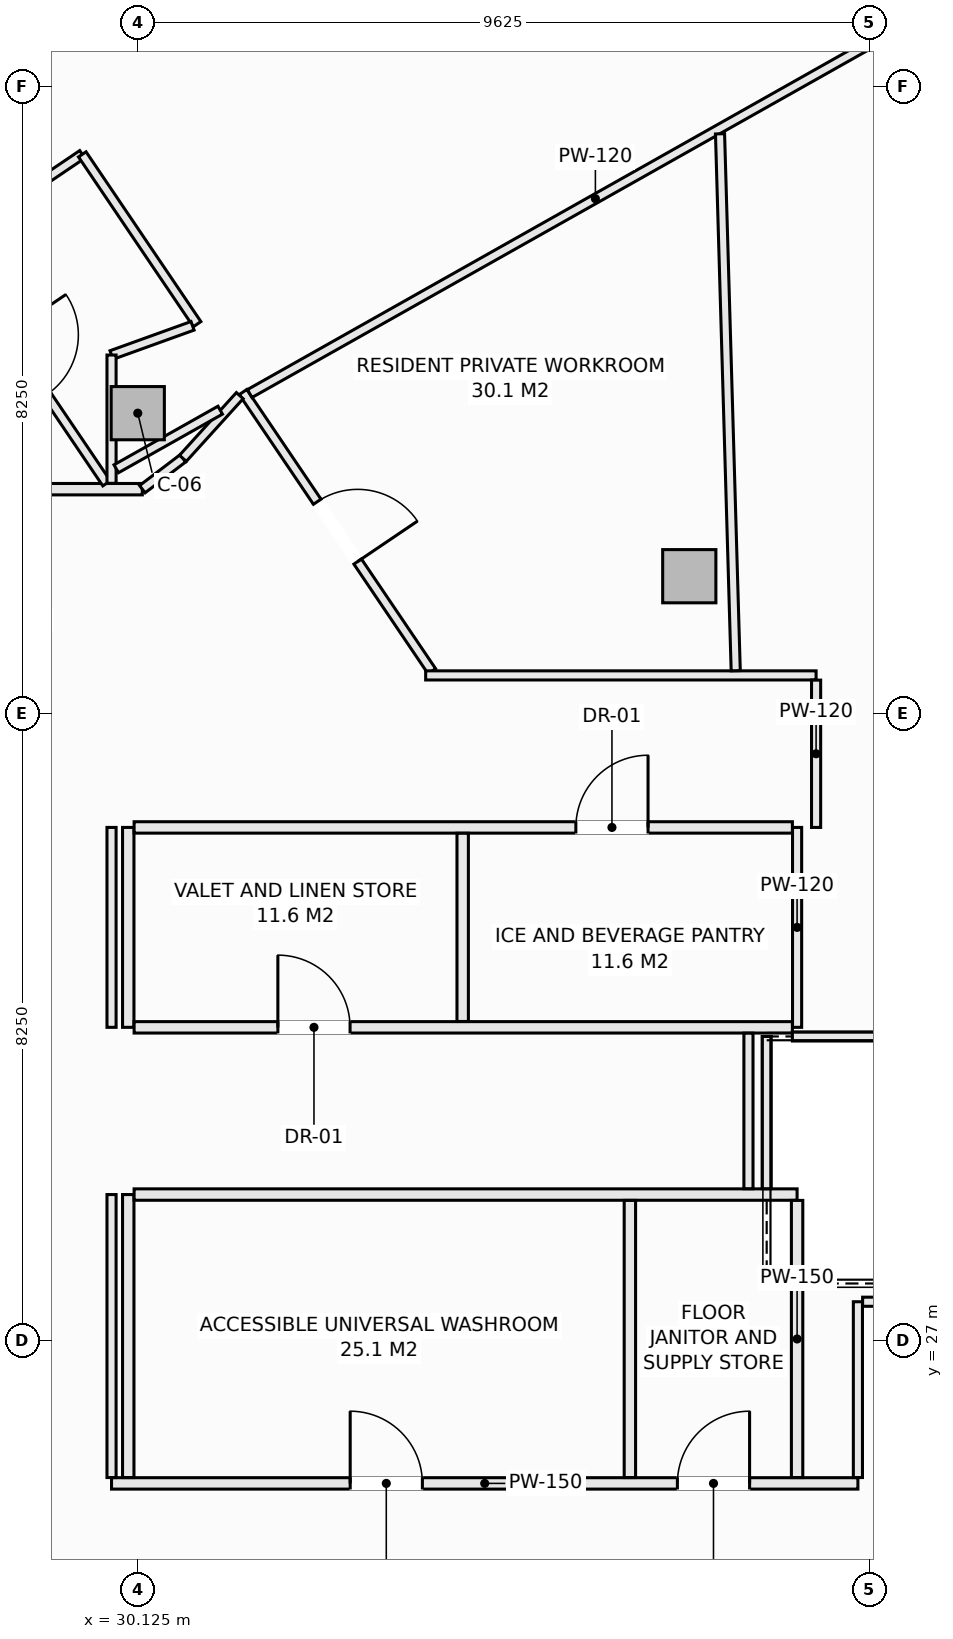
"""IFC4 building model, lengths in metres.
Left out: names, types, materials, properties, quantities, classifications, styles, units other than length and angle.
Written with IfcOpenShell. Run it as: python <this file> out.ifc"""

import sys

from ifc_helpers import new_model, si_unit, direction, frame, frame_2d, origin, origin_2d, place, context, subcontext, project, spatial, rectangle, extrude, element, fill, save


model = new_model("IFC4")
c1 = context("Model", 3, precision=1e-05, world=origin(), true_north=direction((0.0, 1.0)))
c2 = subcontext(c1, "Body", "Model", "MODEL_VIEW")
j1 = project(units=[si_unit("LENGTHUNIT", "METRE"), si_unit("PLANEANGLEUNIT", "RADIAN")], contexts=[c1])
p1 = place(None, origin())
s1 = spatial("IfcSite", under=j1, at=p1, CompositionType="ELEMENT")
p2 = place(p1, origin())
s2 = spatial("IfcBuilding", under=s1, at=p2, CompositionType="ELEMENT")
p3 = place(p2, frame((0.0, 0.0, 196.4)))
s3 = spatial("IfcBuildingStorey", under=s2, at=p3, CompositionType="ELEMENT", Elevation=196.4)
for number, where, z_axis, x_axis in (
    (1, (37.382, 37.055, -0.27), (0.0, 0.0, 1.0), (1.0, 0.0, 0.0)),
    (2, (30.125, 39.2, -0.27), (0.0, 0.0, 1.0), (1.0, 0.0, 0.0)),
):
    element("IfcColumn", number, at=place(p3, frame(where, z_axis=z_axis, x_axis=x_axis)), inside=s3, PredefinedType="COLUMN", context=c2, shape_type="SweptSolid", body=[
        extrude(rectangle(XDim=0.7, YDim=0.7, at=origin_2d()), origin(), (0.0, 0.0, 1.0), 3.3),
    ])
p4 = place(p3, frame((29.78, 25.12, 0.0), z_axis=(0.0, 0.0, 1.0), x_axis=(1.0, 0.0, 0.0)))
e3 = element("IfcWall", 3, at=p4, inside=s3, PredefinedType="PARTITIONING", context=c2, shape_type="SweptSolid", body=[
    extrude(rectangle(XDim=9.82, YDim=0.15, at=frame_2d((4.91, 0.0))), origin(), (0.0, 0.0, 1.0), 3.03),
])
p5 = place(p4, frame((3.14, 0.0, 0.0)))
e4 = element("IfcOpeningElement", 4, at=p5, cuts=e3, PredefinedType="OPENING", context=c2, shape_type="SweptSolid", body=[
    extrude(rectangle(XDim=0.95, YDim=2.1, at=frame_2d((0.475, 1.05))), frame((0.0, 0.085, 0.0), z_axis=(0.0, -1.0, 0.0), x_axis=(1.0, 0.0, 0.0)), (0.0, 0.0, 1.0), 0.17),
])
p6 = place(p4, frame((7.445, 0.0, 0.0)))
e5 = element("IfcOpeningElement", 5, at=p6, cuts=e3, PredefinedType="OPENING", context=c2, shape_type="SweptSolid", body=[
    extrude(rectangle(XDim=0.95, YDim=2.1, at=frame_2d((0.475, 1.05))), frame((0.0, 0.085, 0.0), z_axis=(0.0, -1.0, 0.0), x_axis=(1.0, 0.0, 0.0)), (0.0, 0.0, 1.0), 0.17),
])
p7 = place(p3, frame((30.0, 25.197, 0.0), z_axis=(0.0, 0.0, 1.0), x_axis=(0.0, 1.0, 0.0)))
e6 = element("IfcWall", 6, at=p7, inside=s3, PredefinedType="PARTITIONING", context=c2, shape_type="SweptSolid", body=[
    extrude(rectangle(XDim=3.723, YDim=0.15, at=frame_2d((1.861, 0.0))), origin(), (0.0, 0.0, 1.0), 3.03),
])
p8 = place(p3, frame((30.0, 31.12, 0.0), z_axis=(0.0, 0.0, 1.0), x_axis=(0.0, 1.0, 0.0)))
e7 = element("IfcWall", 7, at=p8, inside=s3, PredefinedType="PARTITIONING", context=c2, shape_type="SweptSolid", body=[
    extrude(rectangle(XDim=2.63, YDim=0.15, at=frame_2d((1.315, 0.0))), origin(), (0.0, 0.0, 1.0), 3.03),
])
p9 = place(p3, frame((30.077, 28.92, 0.0), z_axis=(0.0, 0.0, 1.0), x_axis=(1.0, 0.0, 0.0)))
e8 = element("IfcWall", 8, at=p9, inside=s3, PredefinedType="PARTITIONING", context=c2, shape_type="SweptSolid", body=[
    extrude(rectangle(XDim=8.723, YDim=0.15, at=frame_2d((4.362, 0.0))), origin(), (0.0, 0.0, 1.0), 3.03),
])
for number, where, z_axis, x_axis in (
    (9, (36.6, 25.197, 0.0), (0.0, 0.0, 1.0), (0.0, 1.0, 0.0)),
    (10, (38.8, 25.197, 0.0), (0.0, 0.0, 1.0), (0.0, 1.0, 0.0)),
):
    element("IfcWall", number, at=place(p3, frame(where, z_axis=z_axis, x_axis=x_axis)), inside=s3, PredefinedType="PARTITIONING", context=c2, shape_type="SweptSolid", body=[
        extrude(rectangle(XDim=3.646, YDim=0.15, at=frame_2d((1.823, 0.0))), origin(), (0.0, 0.0, 1.0), 3.03),
    ])
p10 = place(p3, frame((38.8, 31.12, 0.0), z_axis=(0.0, 0.0, 1.0), x_axis=(0.0, 1.0, 0.0)))
e11 = element("IfcWall", 11, at=p10, inside=s3, PredefinedType="PARTITIONING", context=c2, shape_type="SweptSolid", body=[
    extrude(rectangle(XDim=2.63, YDim=0.12, at=frame_2d((1.315, 0.0))), origin(), (0.0, 0.0, 1.0), 3.03),
])
p11 = place(p3, frame((30.077, 31.12, 0.0), z_axis=(0.0, 0.0, 1.0), x_axis=(1.0, 0.0, 0.0)))
e12 = element("IfcWall", 12, at=p11, inside=s3, PredefinedType="PARTITIONING", context=c2, shape_type="SweptSolid", body=[
    extrude(rectangle(XDim=8.661, YDim=0.15, at=frame_2d((4.331, 0.0))), origin(), (0.0, 0.0, 1.0), 3.03),
])
p12 = place(p11, frame((1.892, 0.0, 0.0)))
e13 = element("IfcOpeningElement", 13, at=p12, cuts=e12, PredefinedType="OPENING", context=c2, shape_type="SweptSolid", body=[
    extrude(rectangle(XDim=0.95, YDim=2.1, at=frame_2d((0.475, 1.05))), frame((0.0, 0.085, 0.0), z_axis=(0.0, -1.0, 0.0), x_axis=(1.0, 0.0, 0.0)), (0.0, 0.0, 1.0), 0.17),
])
p13 = place(p3, frame((30.077, 33.75, 0.0), z_axis=(0.0, 0.0, 1.0), x_axis=(1.0, 0.0, 0.0)))
e14 = element("IfcWall", 14, at=p13, inside=s3, PredefinedType="PARTITIONING", context=c2, shape_type="SweptSolid", body=[
    extrude(rectangle(XDim=8.661, YDim=0.15, at=frame_2d((4.331, 0.0))), origin(), (0.0, 0.0, 1.0), 3.03),
])
p14 = place(p13, frame((5.812, 0.0, 0.0)))
e15 = element("IfcOpeningElement", 15, at=p14, cuts=e14, PredefinedType="OPENING", context=c2, shape_type="SweptSolid", body=[
    extrude(rectangle(XDim=0.95, YDim=2.1, at=frame_2d((0.475, 1.05))), frame((0.0, 0.085, 0.0), z_axis=(0.0, -1.0, 0.0), x_axis=(1.0, 0.0, 0.0)), (0.0, 0.0, 1.0), 0.17),
])
p15 = place(p3, frame((34.4, 31.197, 0.0), z_axis=(0.0, 0.0, 1.0), x_axis=(0.0, 1.0, 0.0)))
e16 = element("IfcWall", 16, at=p15, inside=s3, PredefinedType="PARTITIONING", context=c2, shape_type="SweptSolid", body=[
    extrude(rectangle(XDim=2.476, YDim=0.15, at=frame_2d((1.238, 0.0))), origin(), (0.0, 0.0, 1.0), 3.03),
])
p16 = place(p3, frame((27.227, 38.2, 0.0), z_axis=(0.0, 0.0, 1.0), x_axis=(1.0, 0.0, 0.0)))
e17 = element("IfcWall", 17, at=p16, inside=s3, PredefinedType="PARTITIONING", context=c2, shape_type="SweptSolid", body=[
    extrude(rectangle(XDim=2.958, YDim=0.15, at=frame_2d((1.479, 0.0))), origin(), (0.0, 0.0, 1.0), 3.03),
])
p17 = place(p3, frame((27.605, 41.395, 0.0), z_axis=(0.0, 0.0, 1.0), x_axis=(0.560433673257, -0.82819931048, 0.0)))
e18 = element("IfcWall", 18, at=p17, inside=s3, PredefinedType="PARTITIONING", context=c2, shape_type="SweptSolid", body=[
    extrude(rectangle(XDim=3.765, YDim=0.12, at=frame_2d((1.882, 0.0))), origin(), (0.0, 0.0, 1.0), 3.03),
])
p18 = place(p17, frame((1.407, 0.0, 0.0)))
e19 = element("IfcOpeningElement", 19, at=p18, cuts=e18, PredefinedType="OPENING", context=c2, shape_type="SweptSolid", body=[
    extrude(rectangle(XDim=0.95, YDim=2.1, at=frame_2d((0.475, 1.05))), frame((0.0, 0.07, 0.0), z_axis=(0.0, -1.0, 0.0), x_axis=(1.0, 0.0, 0.0)), (0.0, 0.0, 1.0), 0.14),
])
p19 = place(p3, frame((27.656, 41.43, 0.0), z_axis=(0.0, 0.0, 1.0), x_axis=(0.828453292792, 0.560058159178, 0.0)))
e20 = element("IfcWall", 20, at=p19, inside=s3, PredefinedType="PARTITIONING", context=c2, shape_type="SweptSolid", body=[
    extrude(rectangle(XDim=2.099, YDim=0.12, at=frame_2d((1.049, 0.0))), origin(), (0.0, 0.0, 1.0), 3.03),
])
p20 = place(p3, frame((29.395, 42.605, 0.0), z_axis=(0.0, 0.0, 1.0), x_axis=(0.560265527613, -0.828313067969, 0.0)))
e21 = element("IfcWall", 21, at=p20, inside=s3, PredefinedType="PARTITIONING", context=c2, shape_type="SweptSolid", body=[
    extrude(rectangle(XDim=2.697, YDim=0.12, at=frame_2d((1.349, 0.0))), origin(), (0.0, 0.0, 1.0), 2.712),
])
p21 = place(p3, frame((31.51, 39.478, 0.0), z_axis=(0.0, 0.0, 1.0), x_axis=(0.560227160028, -0.828339018257, 0.0)))
e22 = element("IfcWall", 22, at=p21, inside=s3, PredefinedType="PARTITIONING", context=c2, shape_type="SweptSolid", body=[
    extrude(rectangle(XDim=4.435, YDim=0.12, at=frame_2d((2.217, 0.0))), origin(), (0.0, 0.0, 1.0), 3.03),
])
p22 = place(p21, frame((1.742, 0.0, 0.0)))
e23 = element("IfcOpeningElement", 23, at=p22, cuts=e22, PredefinedType="OPENING", context=c2, shape_type="SweptSolid", body=[
    extrude(rectangle(XDim=0.95, YDim=2.1, at=frame_2d((0.475, 1.05))), frame((0.0, 0.07, 0.0), z_axis=(0.0, -1.0, 0.0), x_axis=(1.0, 0.0, 0.0)), (0.0, 0.0, 1.0), 0.14),
])
p23 = place(p3, frame((29.78, 39.965, 0.0), z_axis=(0.0, 0.0, 1.0), x_axis=(0.940708705525, 0.33921546449, 0.0)))
e24 = element("IfcWall", 24, at=p23, inside=s3, PredefinedType="PARTITIONING", context=c2, shape_type="SweptSolid", body=[
    extrude(rectangle(XDim=1.133, YDim=0.12, at=frame_2d((0.566, 0.0))), origin(), (0.0, 0.0, 1.0), 3.03),
])
p24 = place(p3, frame((29.78, 25.197, 0.0), z_axis=(0.0, 0.0, 1.0), x_axis=(0.0, 1.0, 0.0)))
e25 = element("IfcWall", 25, at=p24, inside=s3, PredefinedType="PARTITIONING", context=c2, shape_type="SweptSolid", body=[
    extrude(rectangle(XDim=3.723, YDim=0.12, at=frame_2d((1.861, 0.0))), origin(), (0.0, 0.0, 1.0), 3.03),
])
p25 = place(p3, frame((29.78, 31.12, 0.0), z_axis=(0.0, 0.0, 1.0), x_axis=(0.0, 1.0, 0.0)))
e26 = element("IfcWall", 26, at=p25, inside=s3, PredefinedType="PARTITIONING", context=c2, shape_type="SweptSolid", body=[
    extrude(rectangle(XDim=2.63, YDim=0.12, at=frame_2d((1.315, 0.0))), origin(), (0.0, 0.0, 1.0), 3.03),
])
p26 = place(p3, frame((29.78, 38.277, 0.0), z_axis=(0.0, 0.0, 1.0), x_axis=(0.0, 1.0, 0.0)))
e27 = element("IfcWall", 27, at=p26, inside=s3, PredefinedType="PARTITIONING", context=c2, shape_type="SweptSolid", body=[
    extrude(rectangle(XDim=1.688, YDim=0.12, at=frame_2d((0.844, 0.0))), origin(), (0.0, 0.0, 1.0), 3.03),
])
p27 = place(p3, frame((30.185, 38.2, 0.0), z_axis=(0.0, 0.0, 1.0), x_axis=(0.796007867519, 0.605286275119, 0.0)))
e28 = element("IfcWall", 28, at=p27, inside=s3, PredefinedType="PARTITIONING", context=c2, shape_type="SweptSolid", body=[
    extrude(rectangle(XDim=0.671, YDim=0.12, at=frame_2d((0.335, 0.0))), origin(), (0.0, 0.0, 1.0), 3.03),
])
p28 = place(p3, frame((30.719, 38.606, 0.0), z_axis=(0.0, 0.0, 1.0), x_axis=(0.671842916063, 0.740693658766, 0.0)))
e29 = element("IfcWall", 29, at=p28, inside=s3, PredefinedType="PARTITIONING", context=c2, shape_type="SweptSolid", body=[
    extrude(rectangle(XDim=1.114, YDim=0.12, at=frame_2d((0.557, 0.0))), origin(), (0.0, 0.0, 1.0), 3.03),
])
p29 = place(p3, frame((33.913, 35.75, 0.0), z_axis=(0.0, 0.0, 1.0), x_axis=(1.0, 0.0, 0.0)))
e30 = element("IfcWall", 30, at=p29, inside=s3, PredefinedType="PARTITIONING", context=c2, shape_type="SweptSolid", body=[
    extrude(rectangle(XDim=5.137, YDim=0.12, at=frame_2d((2.568, 0.0))), origin(), (0.0, 0.0, 1.0), 2.478),
])
p30 = place(p3, frame((39.05, 33.75, 0.0), z_axis=(0.0, 0.0, 1.0), x_axis=(0.0, 1.0, 0.0)))
e31 = element("IfcWall", 31, at=p30, inside=s3, PredefinedType="PARTITIONING", context=c2, shape_type="SweptSolid", body=[
    extrude(rectangle(XDim=1.938, YDim=0.12, at=frame_2d((0.969, 0.0))), origin(), (0.0, 0.0, 1.0), 3.03),
])
p31 = place(p3, frame((38.16, 28.997, 0.0), z_axis=(0.0, 0.0, 1.0), x_axis=(0.0, 1.0, 0.0)))
e32 = element("IfcWall", 32, at=p31, inside=s3, PredefinedType="PARTITIONING", context=c2, shape_type="SweptSolid", body=[
    extrude(rectangle(XDim=2.046, YDim=0.12, at=frame_2d((1.023, 0.0))), origin(), (0.0, 0.0, 1.0), 3.03),
])
p32 = place(p3, frame((39.6, 25.197, 0.0), z_axis=(0.0, 0.0, 1.0), x_axis=(0.0, 1.0, 0.0)))
e33 = element("IfcWall", 33, at=p32, inside=s3, PredefinedType="PARTITIONING", context=c2, shape_type="SweptSolid", body=[
    extrude(rectangle(XDim=2.313, YDim=0.12, at=frame_2d((1.156, 0.0))), origin(), (0.0, 0.0, 1.0), 3.03),
])
p33 = place(p3, frame((39.662, 27.51, 0.0), z_axis=(0.0, 0.0, 1.0), x_axis=(1.0, 0.0, 0.0)))
e34 = element("IfcWall", 34, at=p33, inside=s3, PredefinedType="PARTITIONING", context=c2, shape_type="SweptSolid", body=[
    extrude(rectangle(XDim=1.858, YDim=0.12, at=frame_2d((0.929, 0.0))), origin(), (0.0, 0.0, 1.0), 3.03),
])
p34 = place(p3, frame((29.842, 38.469, 0.0), z_axis=(0.0, 0.0, 1.0), x_axis=(0.871155836792, 0.491006627269, 0.0)))
e35 = element("IfcWall", 35, at=p34, inside=s3, PredefinedType="PARTITIONING", context=c2, shape_type="SweptSolid", body=[
    extrude(rectangle(XDim=1.57, YDim=0.12, at=frame_2d((0.785, 0.0))), origin(), (0.0, 0.0, 1.0), 3.03),
])
p35 = place(p3, frame((31.598, 39.458, 0.0), z_axis=(0.0, 0.0, 1.0), x_axis=(0.871126204373, 0.491059198117, 0.0)))
e36 = element("IfcWall", 36, at=p35, inside=s3, PredefinedType="PARTITIONING", context=c2, shape_type="SweptSolid", body=[
    extrude(rectangle(XDim=10.442, YDim=0.12, at=frame_2d((5.221, 0.0))), origin(), (0.0, 0.0, 1.0), 3.03),
])
p36 = place(p3, frame((38.738, 31.0, 0.0), z_axis=(0.0, 0.0, 1.0), x_axis=(1.0, 0.0, 0.0)))
e37 = element("IfcWall", 37, at=p36, inside=s3, PredefinedType="PARTITIONING", context=c2, shape_type="SweptSolid", body=[
    extrude(rectangle(XDim=5.3, YDim=0.12, at=frame_2d((2.65, 0.0))), origin(), (0.0, 0.0, 1.0), 3.03),
])
p37 = place(p3, frame((38.4, 28.997, 0.0), z_axis=(0.0, 0.0, 1.0), x_axis=(0.0, 1.0, 0.0)))
e38 = element("IfcWall", 38, at=p37, inside=s3, PredefinedType="PARTITIONING", context=c2, shape_type="SweptSolid", body=[
    extrude(rectangle(XDim=2.003, YDim=0.12, at=frame_2d((1.001, 0.0))), origin(), (0.0, 0.0, 1.0), 3.03),
])
p38 = place(p3, frame((37.786, 42.875, 0.0), z_axis=(0.0, 0.0, 1.0), x_axis=(0.029229495249, -0.999572727023, 0.0)))
e39 = element("IfcWall", 39, at=p38, inside=s3, PredefinedType="PARTITIONING", context=c2, shape_type="SweptSolid", body=[
    extrude(rectangle(XDim=7.066, YDim=0.12, at=frame_2d((3.533, 0.0))), origin(), (0.0, 0.0, 1.0), 2.478),
])
p39 = place(p5, origin())
e40 = element("IfcDoor", 40, at=p39, inside=s3, OperationType="SINGLE_SWING_LEFT", PredefinedType="DOOR", context=c2, shape_type="SweptSolid", body=[
    extrude(rectangle(XDim=0.95, YDim=2.1, at=frame_2d((0.475, 1.05))), frame((0.0, 0.025, 0.0), z_axis=(0.0, -1.0, 0.0), x_axis=(1.0, 0.0, 0.0)), (0.0, 0.0, 1.0), 0.05),
])
fill(e4, e40)
p40 = place(p6, origin())
e41 = element("IfcDoor", 41, at=p40, inside=s3, OperationType="SINGLE_SWING_RIGHT", PredefinedType="DOOR", context=c2, shape_type="SweptSolid", body=[
    extrude(rectangle(XDim=0.95, YDim=2.1, at=frame_2d((0.475, 1.05))), frame((0.0, 0.025, 0.0), z_axis=(0.0, -1.0, 0.0), x_axis=(1.0, 0.0, 0.0)), (0.0, 0.0, 1.0), 0.05),
])
fill(e5, e41)
p41 = place(p12, origin())
e42 = element("IfcDoor", 42, at=p41, inside=s3, OperationType="SINGLE_SWING_LEFT", PredefinedType="DOOR", context=c2, shape_type="SweptSolid", body=[
    extrude(rectangle(XDim=0.95, YDim=2.1, at=frame_2d((0.475, 1.05))), frame((0.0, 0.025, 0.0), z_axis=(0.0, -1.0, 0.0), x_axis=(1.0, 0.0, 0.0)), (0.0, 0.0, 1.0), 0.05),
])
fill(e13, e42)
p42 = place(p14, origin())
e43 = element("IfcDoor", 43, at=p42, inside=s3, OperationType="SINGLE_SWING_RIGHT", PredefinedType="DOOR", context=c2, shape_type="SweptSolid", body=[
    extrude(rectangle(XDim=0.95, YDim=2.1, at=frame_2d((0.475, 1.05))), frame((0.0, 0.025, 0.0), z_axis=(0.0, -1.0, 0.0), x_axis=(1.0, 0.0, 0.0)), (0.0, 0.0, 1.0), 0.05),
])
fill(e15, e43)
p43 = place(p22, origin())
e44 = element("IfcDoor", 44, at=p43, inside=s3, OperationType="SINGLE_SWING_RIGHT", PredefinedType="DOOR", context=c2, shape_type="SweptSolid", body=[
    extrude(rectangle(XDim=0.95, YDim=2.1, at=frame_2d((0.475, 1.05))), frame((0.0, 0.025, 0.0), z_axis=(0.0, -1.0, 0.0), x_axis=(1.0, 0.0, 0.0)), (0.0, 0.0, 1.0), 0.05),
])
fill(e23, e44)
save(model, sys.argv[1])
